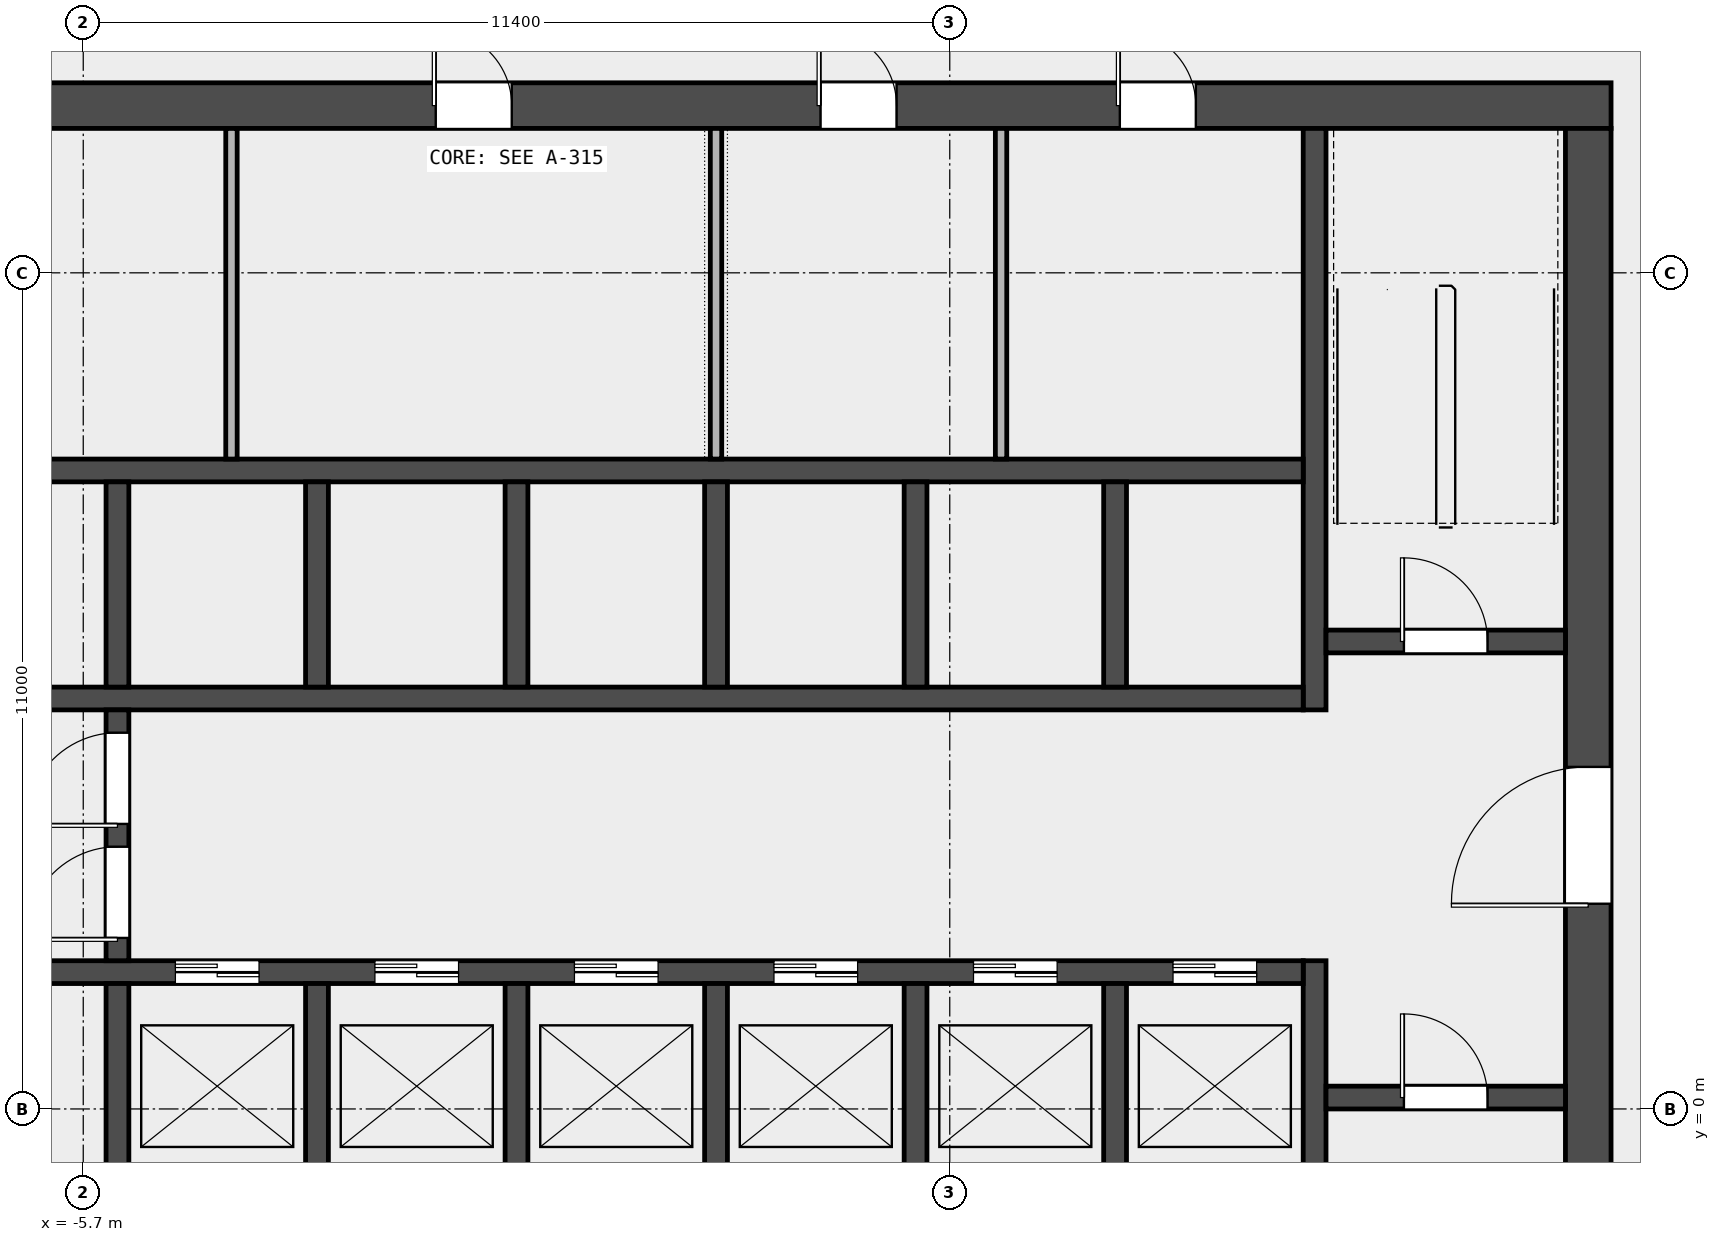
"""IFC4 building model, lengths in metres.
Left out: names, types, materials, properties, quantities, classifications, styles, units other than length and angle.
Written with IfcOpenShell. Run it as: python <this file> out.ifc"""

import sys

from ifc_helpers import new_model, si_unit, direction, frame, frame_2d, origin, place, context, subcontext, project, spatial, rectangle, extrude, element, fill, save


model = new_model("IFC4")
c1 = context("Model", 3, precision=1e-05, world=origin(), true_north=direction((0.0, 1.0)))
c2 = subcontext(c1, "Body", "Model", "MODEL_VIEW")
j1 = project(units=[si_unit("LENGTHUNIT", "METRE"), si_unit("PLANEANGLEUNIT", "RADIAN")], contexts=[c1])
p1 = place(None, origin())
s1 = spatial("IfcSite", under=j1, at=p1, CompositionType="ELEMENT")
p2 = place(p1, origin())
s2 = spatial("IfcBuilding", under=s1, at=p2, CompositionType="ELEMENT")
p3 = place(p2, frame((0.0, 0.0, 177.0)))
s3 = spatial("IfcBuildingStorey", under=s2, at=p3, CompositionType="ELEMENT", Elevation=177.0)
p4 = place(p3, frame((-14.4, 13.2, 0.0), z_axis=(0.0, 0.0, 1.0), x_axis=(1.0, 0.0, 0.0)))
e1 = element("IfcWall", 1, at=p4, inside=s3, PredefinedType="SHEAR", context=c2, shape_type="SweptSolid", body=[
    extrude(rectangle(XDim=28.8, YDim=0.6, at=frame_2d((14.4, 0.0))), origin(), (0.0, 0.0, 1.0), 3.7),
])
p5 = place(p4, frame((6.775, 0.0, 0.0)))
e2 = element("IfcOpeningElement", 2, at=p5, cuts=e1, PredefinedType="OPENING", context=c2, shape_type="SweptSolid", body=[
    extrude(rectangle(XDim=1.0, YDim=2.1, at=frame_2d((0.5, 1.05))), frame((0.0, 0.312, 0.0), z_axis=(0.0, -1.0, 0.0), x_axis=(1.0, 0.0, 0.0)), (0.0, 0.0, 1.0), 0.624),
])
p6 = place(p4, frame((13.337, 0.0, 0.0)))
e3 = element("IfcOpeningElement", 3, at=p6, cuts=e1, PredefinedType="OPENING", context=c2, shape_type="SweptSolid", body=[
    extrude(rectangle(XDim=1.0, YDim=2.1, at=frame_2d((0.5, 1.05))), frame((0.0, 0.312, 0.0), z_axis=(0.0, -1.0, 0.0), x_axis=(1.0, 0.0, 0.0)), (0.0, 0.0, 1.0), 0.624),
])
p7 = place(p4, frame((18.4, 0.0, 0.0)))
e4 = element("IfcOpeningElement", 4, at=p7, cuts=e1, PredefinedType="OPENING", context=c2, shape_type="SweptSolid", body=[
    extrude(rectangle(XDim=1.0, YDim=2.1, at=frame_2d((0.5, 1.05))), frame((0.0, 0.312, 0.0), z_axis=(0.0, -1.0, 0.0), x_axis=(1.0, 0.0, 0.0)), (0.0, 0.0, 1.0), 0.624),
])
p8 = place(p4, frame((22.337, 0.0, 0.0)))
e5 = element("IfcOpeningElement", 5, at=p8, cuts=e1, PredefinedType="OPENING", context=c2, shape_type="SweptSolid", body=[
    extrude(rectangle(XDim=1.0, YDim=2.1, at=frame_2d((0.5, 1.05))), frame((0.0, 0.312, 0.0), z_axis=(0.0, -1.0, 0.0), x_axis=(1.0, 0.0, 0.0)), (0.0, 0.0, 1.0), 0.624),
])
p9 = place(p3, frame((14.1, -6.6, 0.0), z_axis=(0.0, 0.0, 1.0), x_axis=(0.0, 1.0, 0.0)))
e6 = element("IfcWall", 6, at=p9, inside=s3, PredefinedType="SHEAR", context=c2, shape_type="SweptSolid", body=[
    extrude(rectangle(XDim=19.5, YDim=0.6, at=frame_2d((9.75, 0.0))), origin(), (0.0, 0.0, 1.0), 3.7),
])
p10 = place(p9, frame((9.3, 0.0, 0.0)))
e7 = element("IfcOpeningElement", 7, at=p10, cuts=e6, PredefinedType="OPENING", context=c2, shape_type="SweptSolid", body=[
    extrude(rectangle(XDim=1.8, YDim=2.1, at=frame_2d((0.9, 1.05))), frame((0.0, 0.312, 0.0), z_axis=(0.0, -1.0, 0.0), x_axis=(1.0, 0.0, 0.0)), (0.0, 0.0, 1.0), 0.624),
])
p11 = place(p3, frame((10.5, -6.6, 0.0), z_axis=(0.0, 0.0, 1.0), x_axis=(0.0, 1.0, 0.0)))
e8 = element("IfcWall", 8, at=p11, inside=s3, PredefinedType="SHEAR", context=c2, shape_type="SweptSolid", body=[
    extrude(rectangle(XDim=8.55, YDim=0.3, at=frame_2d((4.275, 0.0))), origin(), (0.0, 0.0, 1.0), 3.7),
])
p12 = place(p3, frame((10.5, 5.25, 0.0), z_axis=(0.0, 0.0, 1.0), x_axis=(0.0, 1.0, 0.0)))
e9 = element("IfcWall", 9, at=p12, inside=s3, PredefinedType="SHEAR", context=c2, shape_type="SweptSolid", body=[
    extrude(rectangle(XDim=7.65, YDim=0.3, at=frame_2d((3.825, 0.0))), origin(), (0.0, 0.0, 1.0), 3.7),
])
p13 = place(p3, frame((10.65, 0.15, 0.0), z_axis=(0.0, 0.0, 1.0), x_axis=(1.0, 0.0, 0.0)))
e10 = element("IfcWall", 10, at=p13, inside=s3, PredefinedType="SOLIDWALL", context=c2, shape_type="SweptSolid", body=[
    extrude(rectangle(XDim=3.15, YDim=0.3, at=frame_2d((1.575, 0.0))), origin(), (0.0, 0.0, 1.0), 3.7),
])
p14 = place(p13, frame((1.025, 0.0, 0.0)))
e11 = element("IfcOpeningElement", 11, at=p14, cuts=e10, PredefinedType="OPENING", context=c2, shape_type="SweptSolid", body=[
    extrude(rectangle(XDim=1.1, YDim=2.1, at=frame_2d((0.55, 1.05))), frame((0.0, 0.162, 0.0), z_axis=(0.0, -1.0, 0.0), x_axis=(1.0, 0.0, 0.0)), (0.0, 0.0, 1.0), 0.324),
])
p15 = place(p3, frame((10.65, 6.15, 0.0), z_axis=(0.0, 0.0, 1.0), x_axis=(1.0, 0.0, 0.0)))
e12 = element("IfcWall", 12, at=p15, inside=s3, PredefinedType="SOLIDWALL", context=c2, shape_type="SweptSolid", body=[
    extrude(rectangle(XDim=3.15, YDim=0.3, at=frame_2d((1.575, 0.0))), origin(), (0.0, 0.0, 1.0), 3.7),
])
p16 = place(p15, frame((1.025, 0.0, 0.0)))
e13 = element("IfcOpeningElement", 13, at=p16, cuts=e12, PredefinedType="OPENING", context=c2, shape_type="SweptSolid", body=[
    extrude(rectangle(XDim=1.1, YDim=2.1, at=frame_2d((0.55, 1.05))), frame((0.0, 0.162, 0.0), z_axis=(0.0, -1.0, 0.0), x_axis=(1.0, 0.0, 0.0)), (0.0, 0.0, 1.0), 0.324),
])
p17 = place(p3, frame((-10.35, 1.8, 0.0), z_axis=(0.0, 0.0, 1.0), x_axis=(1.0, 0.0, 0.0)))
e14 = element("IfcWall", 14, at=p17, inside=s3, PredefinedType="SOLIDWALL", context=c2, shape_type="SweptSolid", body=[
    extrude(rectangle(XDim=20.7, YDim=0.3, at=frame_2d((10.35, 0.0))), origin(), (0.0, 0.0, 1.0), 3.7),
])
p18 = place(p17, frame((0.512, 0.0, 0.0)))
e15 = element("IfcOpeningElement", 15, at=p18, cuts=e14, PredefinedType="OPENING", context=c2, shape_type="SweptSolid", body=[
    extrude(rectangle(XDim=1.3, YDim=2.1, at=frame_2d((0.65, 1.05))), frame((0.0, 0.162, 0.0), z_axis=(0.0, -1.0, 0.0), x_axis=(1.0, 0.0, 0.0)), (0.0, 0.0, 1.0), 0.324),
])
p19 = place(p17, frame((5.863, 0.0, 0.0)))
e16 = element("IfcOpeningElement", 16, at=p19, cuts=e14, PredefinedType="OPENING", context=c2, shape_type="SweptSolid", body=[
    extrude(rectangle(XDim=1.1, YDim=2.1, at=frame_2d((0.55, 1.05))), frame((0.0, 0.162, 0.0), z_axis=(0.0, -1.0, 0.0), x_axis=(1.0, 0.0, 0.0)), (0.0, 0.0, 1.0), 0.324),
])
p20 = place(p17, frame((8.488, 0.0, 0.0)))
e17 = element("IfcOpeningElement", 17, at=p20, cuts=e14, PredefinedType="OPENING", context=c2, shape_type="SweptSolid", body=[
    extrude(rectangle(XDim=1.1, YDim=2.1, at=frame_2d((0.55, 1.05))), frame((0.0, 0.162, 0.0), z_axis=(0.0, -1.0, 0.0), x_axis=(1.0, 0.0, 0.0)), (0.0, 0.0, 1.0), 0.324),
])
p21 = place(p17, frame((11.113, 0.0, 0.0)))
e18 = element("IfcOpeningElement", 18, at=p21, cuts=e14, PredefinedType="OPENING", context=c2, shape_type="SweptSolid", body=[
    extrude(rectangle(XDim=1.1, YDim=2.1, at=frame_2d((0.55, 1.05))), frame((0.0, 0.162, 0.0), z_axis=(0.0, -1.0, 0.0), x_axis=(1.0, 0.0, 0.0)), (0.0, 0.0, 1.0), 0.324),
])
p22 = place(p17, frame((13.738, 0.0, 0.0)))
e19 = element("IfcOpeningElement", 19, at=p22, cuts=e14, PredefinedType="OPENING", context=c2, shape_type="SweptSolid", body=[
    extrude(rectangle(XDim=1.1, YDim=2.1, at=frame_2d((0.55, 1.05))), frame((0.0, 0.162, 0.0), z_axis=(0.0, -1.0, 0.0), x_axis=(1.0, 0.0, 0.0)), (0.0, 0.0, 1.0), 0.324),
])
p23 = place(p17, frame((16.363, 0.0, 0.0)))
e20 = element("IfcOpeningElement", 20, at=p23, cuts=e14, PredefinedType="OPENING", context=c2, shape_type="SweptSolid", body=[
    extrude(rectangle(XDim=1.1, YDim=2.1, at=frame_2d((0.55, 1.05))), frame((0.0, 0.162, 0.0), z_axis=(0.0, -1.0, 0.0), x_axis=(1.0, 0.0, 0.0)), (0.0, 0.0, 1.0), 0.324),
])
p24 = place(p17, frame((18.988, 0.0, 0.0)))
e21 = element("IfcOpeningElement", 21, at=p24, cuts=e14, PredefinedType="OPENING", context=c2, shape_type="SweptSolid", body=[
    extrude(rectangle(XDim=1.1, YDim=2.1, at=frame_2d((0.55, 1.05))), frame((0.0, 0.162, 0.0), z_axis=(0.0, -1.0, 0.0), x_axis=(1.0, 0.0, 0.0)), (0.0, 0.0, 1.0), 0.324),
])
p25 = place(p3, frame((-10.35, 5.4, 0.0), z_axis=(0.0, 0.0, 1.0), x_axis=(1.0, 0.0, 0.0)))
e22 = element("IfcWall", 22, at=p25, inside=s3, PredefinedType="SOLIDWALL", context=c2, shape_type="SweptSolid", body=[
    extrude(rectangle(XDim=20.7, YDim=0.3, at=frame_2d((10.35, 0.0))), origin(), (0.0, 0.0, 1.0), 3.7),
])
p26 = place(p25, frame((0.512, 0.0, 0.0)))
e23 = element("IfcOpeningElement", 23, at=p26, cuts=e22, PredefinedType="OPENING", context=c2, shape_type="SweptSolid", body=[
    extrude(rectangle(XDim=1.3, YDim=2.1, at=frame_2d((0.65, 1.05))), frame((0.0, 0.162, 0.0), z_axis=(0.0, -1.0, 0.0), x_axis=(1.0, 0.0, 0.0)), (0.0, 0.0, 1.0), 0.324),
])
p27 = place(p3, frame((-10.35, 8.4, 0.0), z_axis=(0.0, 0.0, 1.0), x_axis=(1.0, 0.0, 0.0)))
e24 = element("IfcWall", 24, at=p27, inside=s3, PredefinedType="SOLIDWALL", context=c2, shape_type="SweptSolid", body=[
    extrude(rectangle(XDim=20.7, YDim=0.3, at=frame_2d((10.35, 0.0))), origin(), (0.0, 0.0, 1.0), 3.7),
])
for number, where, z_axis, x_axis in (
    (25, (-5.25, -1.05, 0.0), (0.0, 0.0, 1.0), (0.0, 1.0, 0.0)),
    (26, (-2.625, -1.05, 0.0), (0.0, 0.0, 1.0), (0.0, 1.0, 0.0)),
    (27, (0.0, -1.05, 0.0), (0.0, 0.0, 1.0), (0.0, 1.0, 0.0)),
    (28, (2.625, -1.05, 0.0), (0.0, 0.0, 1.0), (0.0, 1.0, 0.0)),
    (29, (5.25, -1.05, 0.0), (0.0, 0.0, 1.0), (0.0, 1.0, 0.0)),
    (30, (7.875, -1.05, 0.0), (0.0, 0.0, 1.0), (0.0, 1.0, 0.0)),
    (31, (-5.25, 5.55, 0.0), (0.0, 0.0, 1.0), (0.0, 1.0, 0.0)),
    (32, (-2.625, 5.55, 0.0), (0.0, 0.0, 1.0), (0.0, 1.0, 0.0)),
    (33, (0.0, 5.55, 0.0), (0.0, 0.0, 1.0), (0.0, 1.0, 0.0)),
    (34, (2.625, 5.55, 0.0), (0.0, 0.0, 1.0), (0.0, 1.0, 0.0)),
    (35, (5.25, 5.55, 0.0), (0.0, 0.0, 1.0), (0.0, 1.0, 0.0)),
    (36, (7.875, 5.55, 0.0), (0.0, 0.0, 1.0), (0.0, 1.0, 0.0)),
):
    element("IfcWall", number, at=place(p3, frame(where, z_axis=z_axis, x_axis=x_axis)), inside=s3, PredefinedType="SOLIDWALL", context=c2, shape_type="SweptSolid", body=[
        extrude(rectangle(XDim=2.7, YDim=0.3, at=frame_2d((1.35, 0.0))), origin(), (0.0, 0.0, 1.0), 3.7),
    ])
p28 = place(p3, frame((-5.25, 1.95, 0.0), z_axis=(0.0, 0.0, 1.0), x_axis=(0.0, 1.0, 0.0)))
e37 = element("IfcWall", 37, at=p28, inside=s3, PredefinedType="SOLIDWALL", context=c2, shape_type="SweptSolid", body=[
    extrude(rectangle(XDim=3.3, YDim=0.3, at=frame_2d((1.65, 0.0))), origin(), (0.0, 0.0, 1.0), 3.7),
])
p29 = place(p28, frame((0.3, 0.0, 0.0)))
e38 = element("IfcOpeningElement", 38, at=p29, cuts=e37, PredefinedType="OPENING", context=c2, shape_type="SweptSolid", body=[
    extrude(rectangle(XDim=1.2, YDim=2.1, at=frame_2d((0.6, 1.05))), frame((0.0, 0.162, 0.0), z_axis=(0.0, -1.0, 0.0), x_axis=(1.0, 0.0, 0.0)), (0.0, 0.0, 1.0), 0.324),
])
p30 = place(p28, frame((1.8, 0.0, 0.0)))
e39 = element("IfcOpeningElement", 39, at=p30, cuts=e37, PredefinedType="OPENING", context=c2, shape_type="SweptSolid", body=[
    extrude(rectangle(XDim=1.2, YDim=2.1, at=frame_2d((0.6, 1.05))), frame((0.0, 0.162, 0.0), z_axis=(0.0, -1.0, 0.0), x_axis=(1.0, 0.0, 0.0)), (0.0, 0.0, 1.0), 0.324),
])
for number, where, z_axis, x_axis in (
    (40, (-3.75, 8.55, 0.0), (0.0, 0.0, 1.0), (0.0, 1.0, 0.0)),
    (41, (2.625, 8.55, 0.0), (0.0, 0.0, 1.0), (0.0, 1.0, 0.0)),
    (42, (6.375, 8.55, 0.0), (0.0, 0.0, 1.0), (0.0, 1.0, 0.0)),
):
    element("IfcWall", number, at=place(p3, frame(where, z_axis=z_axis, x_axis=x_axis)), inside=s3, PredefinedType="PARTITIONING", context=c2, shape_type="SweptSolid", body=[
        extrude(rectangle(XDim=4.35, YDim=0.15, at=frame_2d((2.175, 0.0))), origin(), (0.0, 0.0, 1.0), 3.7),
    ])
p31 = place(p14, origin())
e43 = element("IfcDoor", 43, at=p31, inside=s3, OperationType="SINGLE_SWING_RIGHT", PredefinedType="DOOR", context=c2, shape_type="SweptSolid", body=[
    extrude(rectangle(XDim=1.1, YDim=2.1, at=frame_2d((0.55, 1.05))), frame((0.0, 0.025, 0.0), z_axis=(0.0, -1.0, 0.0), x_axis=(1.0, 0.0, 0.0)), (0.0, 0.0, 1.0), 0.05),
])
fill(e11, e43)
p32 = place(p16, origin())
e44 = element("IfcDoor", 44, at=p32, inside=s3, OperationType="SINGLE_SWING_RIGHT", PredefinedType="DOOR", context=c2, shape_type="SweptSolid", body=[
    extrude(rectangle(XDim=1.1, YDim=2.1, at=frame_2d((0.55, 1.05))), frame((0.0, 0.025, 0.0), z_axis=(0.0, -1.0, 0.0), x_axis=(1.0, 0.0, 0.0)), (0.0, 0.0, 1.0), 0.05),
])
fill(e13, e44)
p33 = place(p10, origin())
e45 = element("IfcDoor", 45, at=p33, inside=s3, OperationType="DOUBLE_DOOR_SINGLE_SWING", PredefinedType="DOOR", context=c2, shape_type="SweptSolid", body=[
    extrude(rectangle(XDim=1.8, YDim=2.1, at=frame_2d((0.9, 1.05))), frame((0.0, 0.025, 0.0), z_axis=(0.0, -1.0, 0.0), x_axis=(1.0, 0.0, 0.0)), (0.0, 0.0, 1.0), 0.05),
])
fill(e7, e45)
p34 = place(p29, origin())
e46 = element("IfcDoor", 46, at=p34, inside=s3, OperationType="SINGLE_SWING_LEFT", PredefinedType="DOOR", context=c2, shape_type="SweptSolid", body=[
    extrude(rectangle(XDim=1.2, YDim=2.1, at=frame_2d((0.6, 1.05))), frame((0.0, 0.025, 0.0), z_axis=(0.0, -1.0, 0.0), x_axis=(1.0, 0.0, 0.0)), (0.0, 0.0, 1.0), 0.05),
])
fill(e38, e46)
p35 = place(p30, origin())
e47 = element("IfcDoor", 47, at=p35, inside=s3, OperationType="SINGLE_SWING_RIGHT", PredefinedType="DOOR", context=c2, shape_type="SweptSolid", body=[
    extrude(rectangle(XDim=1.2, YDim=2.1, at=frame_2d((0.6, 1.05))), frame((0.0, 0.025, 0.0), z_axis=(0.0, -1.0, 0.0), x_axis=(1.0, 0.0, 0.0)), (0.0, 0.0, 1.0), 0.05),
])
fill(e39, e47)
p36 = place(p19, origin())
e48 = element("IfcDoor", 48, at=p36, inside=s3, OperationType="DOUBLE_DOOR_SLIDING", PredefinedType="DOOR", context=c2, shape_type="SweptSolid", body=[
    extrude(rectangle(XDim=1.1, YDim=2.1, at=frame_2d((0.55, 1.05))), frame((0.0, 0.025, 0.0), z_axis=(0.0, -1.0, 0.0), x_axis=(1.0, 0.0, 0.0)), (0.0, 0.0, 1.0), 0.05),
])
fill(e16, e48)
p37 = place(p20, origin())
e49 = element("IfcDoor", 49, at=p37, inside=s3, OperationType="DOUBLE_DOOR_SLIDING", PredefinedType="DOOR", context=c2, shape_type="SweptSolid", body=[
    extrude(rectangle(XDim=1.1, YDim=2.1, at=frame_2d((0.55, 1.05))), frame((0.0, 0.025, 0.0), z_axis=(0.0, -1.0, 0.0), x_axis=(1.0, 0.0, 0.0)), (0.0, 0.0, 1.0), 0.05),
])
fill(e17, e49)
p38 = place(p21, origin())
e50 = element("IfcDoor", 50, at=p38, inside=s3, OperationType="DOUBLE_DOOR_SLIDING", PredefinedType="DOOR", context=c2, shape_type="SweptSolid", body=[
    extrude(rectangle(XDim=1.1, YDim=2.1, at=frame_2d((0.55, 1.05))), frame((0.0, 0.025, 0.0), z_axis=(0.0, -1.0, 0.0), x_axis=(1.0, 0.0, 0.0)), (0.0, 0.0, 1.0), 0.05),
])
fill(e18, e50)
p39 = place(p22, origin())
e51 = element("IfcDoor", 51, at=p39, inside=s3, OperationType="DOUBLE_DOOR_SLIDING", PredefinedType="DOOR", context=c2, shape_type="SweptSolid", body=[
    extrude(rectangle(XDim=1.1, YDim=2.1, at=frame_2d((0.55, 1.05))), frame((0.0, 0.025, 0.0), z_axis=(0.0, -1.0, 0.0), x_axis=(1.0, 0.0, 0.0)), (0.0, 0.0, 1.0), 0.05),
])
fill(e19, e51)
p40 = place(p23, origin())
e52 = element("IfcDoor", 52, at=p40, inside=s3, OperationType="DOUBLE_DOOR_SLIDING", PredefinedType="DOOR", context=c2, shape_type="SweptSolid", body=[
    extrude(rectangle(XDim=1.1, YDim=2.1, at=frame_2d((0.55, 1.05))), frame((0.0, 0.025, 0.0), z_axis=(0.0, -1.0, 0.0), x_axis=(1.0, 0.0, 0.0)), (0.0, 0.0, 1.0), 0.05),
])
fill(e20, e52)
p41 = place(p24, origin())
e53 = element("IfcDoor", 53, at=p41, inside=s3, OperationType="DOUBLE_DOOR_SLIDING", PredefinedType="DOOR", context=c2, shape_type="SweptSolid", body=[
    extrude(rectangle(XDim=1.1, YDim=2.1, at=frame_2d((0.55, 1.05))), frame((0.0, 0.025, 0.0), z_axis=(0.0, -1.0, 0.0), x_axis=(1.0, 0.0, 0.0)), (0.0, 0.0, 1.0), 0.05),
])
fill(e21, e53)
p42 = place(p6, origin())
e54 = element("IfcDoor", 54, at=p42, inside=s3, OperationType="SINGLE_SWING_LEFT", PredefinedType="DOOR", context=c2, shape_type="SweptSolid", body=[
    extrude(rectangle(XDim=1.0, YDim=2.1, at=frame_2d((0.5, 1.05))), frame((0.0, 0.025, 0.0), z_axis=(0.0, -1.0, 0.0), x_axis=(1.0, 0.0, 0.0)), (0.0, 0.0, 1.0), 0.05),
])
fill(e3, e54)
p43 = place(p7, origin())
e55 = element("IfcDoor", 55, at=p43, inside=s3, OperationType="SINGLE_SWING_LEFT", PredefinedType="DOOR", context=c2, shape_type="SweptSolid", body=[
    extrude(rectangle(XDim=1.0, YDim=2.1, at=frame_2d((0.5, 1.05))), frame((0.0, 0.025, 0.0), z_axis=(0.0, -1.0, 0.0), x_axis=(1.0, 0.0, 0.0)), (0.0, 0.0, 1.0), 0.05),
])
fill(e4, e55)
p44 = place(p8, origin())
e56 = element("IfcDoor", 56, at=p44, inside=s3, OperationType="SINGLE_SWING_LEFT", PredefinedType="DOOR", context=c2, shape_type="SweptSolid", body=[
    extrude(rectangle(XDim=1.0, YDim=2.1, at=frame_2d((0.5, 1.05))), frame((0.0, 0.025, 0.0), z_axis=(0.0, -1.0, 0.0), x_axis=(1.0, 0.0, 0.0)), (0.0, 0.0, 1.0), 0.05),
])
fill(e5, e56)
save(model, sys.argv[1])
